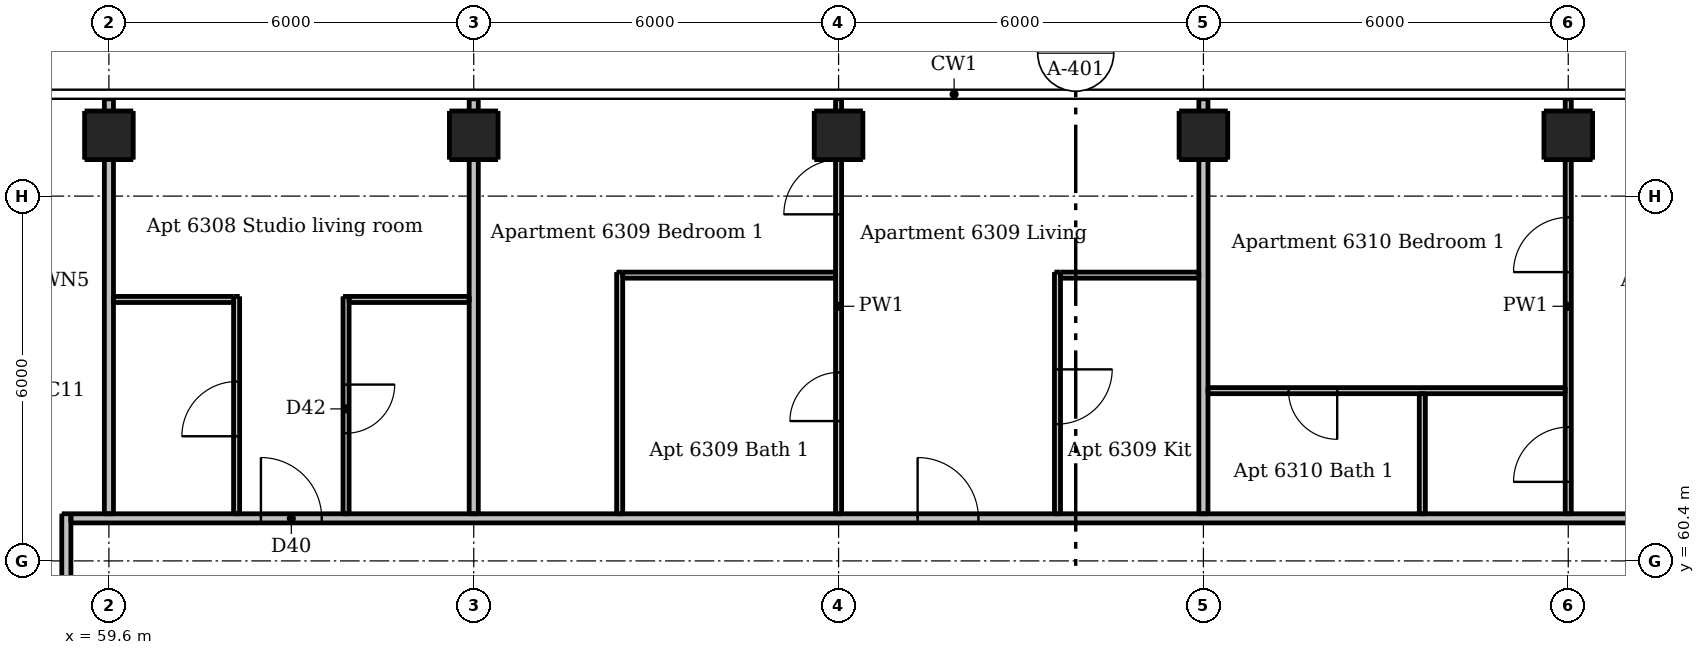
"""IFC4 building model, lengths in metres.
Left out: names, types, materials, properties, quantities, classifications, styles, units other than length and angle.
Written with IfcOpenShell. Run it as: python <this file> out.ifc"""

import sys

from ifc_helpers import new_model, si_unit, direction, frame, frame_2d, origin, origin_2d, place, context, subcontext, project, spatial, rectangle, extrude, element, fill, save


model = new_model("IFC4")
c1 = context("Model", 3, precision=1e-05, world=origin(), true_north=direction((0.0, 1.0)))
c2 = subcontext(c1, "Body", "Model", "MODEL_VIEW")
j1 = project(units=[si_unit("LENGTHUNIT", "METRE"), si_unit("PLANEANGLEUNIT", "RADIAN")], contexts=[c1])
p1 = place(None, origin())
s1 = spatial("IfcSite", under=j1, at=p1, CompositionType="ELEMENT")
p2 = place(p1, origin())
s2 = spatial("IfcBuilding", under=s1, at=p2, CompositionType="ELEMENT")
p3 = place(p2, frame((0.0, 0.0, 238.9)))
s3 = spatial("IfcBuildingStorey", under=s2, at=p3, CompositionType="ELEMENT", Elevation=238.9)
for number, where, z_axis, x_axis in (
    (1, (59.6, 67.4, 0.0), (0.0, 0.0, 1.0), (1.0, 0.0, 0.0)),
    (2, (65.6, 67.4, 0.0), (0.0, 0.0, 1.0), (1.0, 0.0, 0.0)),
    (3, (71.6, 67.4, 0.0), (0.0, 0.0, 1.0), (1.0, 0.0, 0.0)),
    (4, (77.6, 67.4, 0.0), (0.0, 0.0, 1.0), (1.0, 0.0, 0.0)),
    (5, (83.6, 67.4, 0.0), (0.0, 0.0, 1.0), (1.0, 0.0, 0.0)),
):
    element("IfcColumn", number, at=place(p3, frame(where, z_axis=z_axis, x_axis=x_axis)), inside=s3, PredefinedType="COLUMN", context=c2, shape_type="SweptSolid", body=[
        extrude(rectangle(XDim=0.8, YDim=0.8, at=origin_2d()), origin(), (0.0, 0.0, 1.0), 3.05),
    ])
p4 = place(p3, frame((61.7, 61.175, 0.0), z_axis=(0.0, 0.0, 1.0), x_axis=(0.0, 1.0, 0.0)))
e6 = element("IfcWall", 6, at=p4, inside=s3, PredefinedType="PARTITIONING", context=c2, shape_type="SweptSolid", body=[
    extrude(rectangle(XDim=3.575, YDim=0.1, at=frame_2d((1.788, 0.0))), origin(), (0.0, 0.0, 1.0), 3.05),
])
p5 = place(p4, frame((1.275, 0.0, 0.0)))
e7 = element("IfcOpeningElement", 7, at=p5, cuts=e6, PredefinedType="OPENING", context=c2, shape_type="SweptSolid", body=[
    extrude(rectangle(XDim=0.9, YDim=2.1, at=frame_2d((0.45, 1.05))), frame((0.0, 0.06, 0.0), z_axis=(0.0, -1.0, 0.0), x_axis=(1.0, 0.0, 0.0)), (0.0, 0.0, 1.0), 0.12),
])
p6 = place(p3, frame((63.5, 64.75, 0.0), z_axis=(0.0, 0.0, 1.0), x_axis=(0.0, -1.0, 0.0)))
e8 = element("IfcWall", 8, at=p6, inside=s3, PredefinedType="PARTITIONING", context=c2, shape_type="SweptSolid", body=[
    extrude(rectangle(XDim=3.575, YDim=0.1, at=frame_2d((1.788, 0.0))), origin(), (0.0, 0.0, 1.0), 3.05),
])
p7 = place(p6, frame((1.45, 0.0, 0.0)))
e9 = element("IfcOpeningElement", 9, at=p7, cuts=e8, PredefinedType="OPENING", context=c2, shape_type="SweptSolid", body=[
    extrude(rectangle(XDim=0.8, YDim=2.1, at=frame_2d((0.4, 1.05))), frame((0.0, 0.06, 0.0), z_axis=(0.0, -1.0, 0.0), x_axis=(1.0, 0.0, 0.0)), (0.0, 0.0, 1.0), 0.12),
])
p8 = place(p3, frame((68.0, 61.175, 0.0), z_axis=(0.0, 0.0, 1.0), x_axis=(0.0, 1.0, 0.0)))
e10 = element("IfcWall", 10, at=p8, inside=s3, PredefinedType="PARTITIONING", context=c2, shape_type="SweptSolid", body=[
    extrude(rectangle(XDim=3.975, YDim=0.1, at=frame_2d((1.987, 0.0))), origin(), (0.0, 0.0, 1.0), 3.05),
])
p9 = place(p3, frame((71.6, 61.175, 0.0), z_axis=(0.0, 0.0, 1.0), x_axis=(0.0, 1.0, 0.0)))
e11 = element("IfcWall", 11, at=p9, inside=s3, PredefinedType="PARTITIONING", context=c2, shape_type="SweptSolid", body=[
    extrude(rectangle(XDim=6.825, YDim=0.1, at=frame_2d((3.413, 0.0))), origin(), (0.0, 0.0, 1.0), 2.516),
])
p10 = place(p9, frame((4.925, 0.0, 0.0)))
e12 = element("IfcOpeningElement", 12, at=p10, cuts=e11, PredefinedType="OPENING", context=c2, shape_type="SweptSolid", body=[
    extrude(rectangle(XDim=0.9, YDim=2.1, at=frame_2d((0.45, 1.05))), frame((0.0, 0.06, 0.0), z_axis=(0.0, -1.0, 0.0), x_axis=(1.0, 0.0, 0.0)), (0.0, 0.0, 1.0), 0.12),
])
p11 = place(p9, frame((1.525, 0.0, 0.0)))
e13 = element("IfcOpeningElement", 13, at=p11, cuts=e11, PredefinedType="OPENING", context=c2, shape_type="SweptSolid", body=[
    extrude(rectangle(XDim=0.8, YDim=2.1, at=frame_2d((0.4, 1.05))), frame((0.0, 0.06, 0.0), z_axis=(0.0, -1.0, 0.0), x_axis=(1.0, 0.0, 0.0)), (0.0, 0.0, 1.0), 0.12),
])
p12 = place(p3, frame((75.2, 65.15, 0.0), z_axis=(0.0, 0.0, 1.0), x_axis=(0.0, -1.0, 0.0)))
e14 = element("IfcWall", 14, at=p12, inside=s3, PredefinedType="PARTITIONING", context=c2, shape_type="SweptSolid", body=[
    extrude(rectangle(XDim=3.975, YDim=0.1, at=frame_2d((1.987, 0.0))), origin(), (0.0, 0.0, 1.0), 3.05),
])
p13 = place(p12, frame((1.6, 0.0, 0.0)))
e15 = element("IfcOpeningElement", 15, at=p13, cuts=e14, PredefinedType="OPENING", context=c2, shape_type="SweptSolid", body=[
    extrude(rectangle(XDim=0.9, YDim=2.1, at=frame_2d((0.45, 1.05))), frame((0.0, 0.06, 0.0), z_axis=(0.0, -1.0, 0.0), x_axis=(1.0, 0.0, 0.0)), (0.0, 0.0, 1.0), 0.12),
])
p14 = place(p3, frame((81.2, 61.175, 0.0), z_axis=(0.0, 0.0, 1.0), x_axis=(0.0, 1.0, 0.0)))
e16 = element("IfcWall", 16, at=p14, inside=s3, PredefinedType="PARTITIONING", context=c2, shape_type="SweptSolid", body=[
    extrude(rectangle(XDim=1.975, YDim=0.1, at=frame_2d((0.987, 0.0))), origin(), (0.0, 0.0, 1.0), 3.05),
])
p15 = place(p3, frame((83.6, 61.175, 0.0), z_axis=(0.0, 0.0, 1.0), x_axis=(0.0, 1.0, 0.0)))
e17 = element("IfcWall", 17, at=p15, inside=s3, PredefinedType="PARTITIONING", context=c2, shape_type="SweptSolid", body=[
    extrude(rectangle(XDim=6.825, YDim=0.1, at=frame_2d((3.413, 0.0))), origin(), (0.0, 0.0, 1.0), 2.516),
])
p16 = place(p15, frame((0.525, 0.0, 0.0)))
e18 = element("IfcOpeningElement", 18, at=p16, cuts=e17, PredefinedType="OPENING", context=c2, shape_type="SweptSolid", body=[
    extrude(rectangle(XDim=0.9, YDim=2.1, at=frame_2d((0.45, 1.05))), frame((0.0, 0.06, 0.0), z_axis=(0.0, -1.0, 0.0), x_axis=(1.0, 0.0, 0.0)), (0.0, 0.0, 1.0), 0.12),
])
p17 = place(p15, frame((3.975, 0.0, 0.0)))
e19 = element("IfcOpeningElement", 19, at=p17, cuts=e17, PredefinedType="OPENING", context=c2, shape_type="SweptSolid", body=[
    extrude(rectangle(XDim=0.9, YDim=2.1, at=frame_2d((0.45, 1.05))), frame((0.0, 0.06, 0.0), z_axis=(0.0, -1.0, 0.0), x_axis=(1.0, 0.0, 0.0)), (0.0, 0.0, 1.0), 0.12),
])
p18 = place(p3, frame((68.05, 65.1, 0.0), z_axis=(0.0, 0.0, 1.0), x_axis=(1.0, 0.0, 0.0)))
e20 = element("IfcWall", 20, at=p18, inside=s3, PredefinedType="PARTITIONING", context=c2, shape_type="SweptSolid", body=[
    extrude(rectangle(XDim=3.5, YDim=0.1, at=frame_2d((1.75, 0.0))), origin(), (0.0, 0.0, 1.0), 3.05),
])
p19 = place(p3, frame((75.25, 65.1, 0.0), z_axis=(0.0, 0.0, 1.0), x_axis=(1.0, 0.0, 0.0)))
e21 = element("IfcWall", 21, at=p19, inside=s3, PredefinedType="PARTITIONING", context=c2, shape_type="SweptSolid", body=[
    extrude(rectangle(XDim=2.275, YDim=0.1, at=frame_2d((1.137, 0.0))), origin(), (0.0, 0.0, 1.0), 3.05),
])
for number, where, z_axis, x_axis in (
    (22, (59.675, 64.7, 0.0), (0.0, 0.0, 1.0), (1.0, 0.0, 0.0)),
    (23, (63.55, 64.7, 0.0), (0.0, 0.0, 1.0), (1.0, 0.0, 0.0)),
):
    element("IfcWall", number, at=place(p3, frame(where, z_axis=z_axis, x_axis=x_axis)), inside=s3, PredefinedType="PARTITIONING", context=c2, shape_type="SweptSolid", body=[
        extrude(rectangle(XDim=1.975, YDim=0.1, at=frame_2d((0.987, 0.0))), origin(), (0.0, 0.0, 1.0), 3.05),
    ])
p20 = place(p3, frame((83.55, 63.2, 0.0), z_axis=(0.0, 0.0, 1.0), x_axis=(-1.0, 0.0, 0.0)))
e24 = element("IfcWall", 24, at=p20, inside=s3, PredefinedType="PARTITIONING", context=c2, shape_type="SweptSolid", body=[
    extrude(rectangle(XDim=5.875, YDim=0.1, at=frame_2d((2.938, 0.0))), origin(), (0.0, 0.0, 1.0), 3.05),
])
p21 = place(p20, frame((3.75, 0.0, 0.0)))
e25 = element("IfcOpeningElement", 25, at=p21, cuts=e24, PredefinedType="OPENING", context=c2, shape_type="SweptSolid", body=[
    extrude(rectangle(XDim=0.8, YDim=2.1, at=frame_2d((0.4, 1.05))), frame((0.0, 0.06, 0.0), z_axis=(0.0, -1.0, 0.0), x_axis=(1.0, 0.0, 0.0)), (0.0, 0.0, 1.0), 0.12),
])
p22 = place(p3, frame((58.9, 30.325, 0.0), z_axis=(0.0, 0.0, 1.0), x_axis=(0.0, 1.0, 0.0)))
e26 = element("IfcWall", 26, at=p22, inside=s3, PredefinedType="PARTITIONING", context=c2, shape_type="SweptSolid", body=[
    extrude(rectangle(XDim=30.85, YDim=0.15, at=frame_2d((15.425, 0.0))), origin(), (0.0, 0.0, 1.0), 3.05),
])
p23 = place(p22, frame((2.575, 0.0, 0.0)))
e27 = element("IfcOpeningElement", 27, at=p23, cuts=e26, PredefinedType="OPENING", context=c2, shape_type="SweptSolid", body=[
    extrude(rectangle(XDim=1.0, YDim=2.1, at=frame_2d((0.5, 1.05))), frame((0.0, 0.085, 0.0), z_axis=(0.0, -1.0, 0.0), x_axis=(1.0, 0.0, 0.0)), (0.0, 0.0, 1.0), 0.17),
])
p24 = place(p22, frame((8.575, 0.0, 0.0)))
e28 = element("IfcOpeningElement", 28, at=p24, cuts=e26, PredefinedType="OPENING", context=c2, shape_type="SweptSolid", body=[
    extrude(rectangle(XDim=1.0, YDim=2.1, at=frame_2d((0.5, 1.05))), frame((0.0, 0.085, 0.0), z_axis=(0.0, -1.0, 0.0), x_axis=(1.0, 0.0, 0.0)), (0.0, 0.0, 1.0), 0.17),
])
p25 = place(p22, frame((14.575, 0.0, 0.0)))
e29 = element("IfcOpeningElement", 29, at=p25, cuts=e26, PredefinedType="OPENING", context=c2, shape_type="SweptSolid", body=[
    extrude(rectangle(XDim=1.0, YDim=2.1, at=frame_2d((0.5, 1.05))), frame((0.0, 0.085, 0.0), z_axis=(0.0, -1.0, 0.0), x_axis=(1.0, 0.0, 0.0)), (0.0, 0.0, 1.0), 0.17),
])
p26 = place(p22, frame((26.925, 0.0, 0.0)))
e30 = element("IfcOpeningElement", 30, at=p26, cuts=e26, PredefinedType="OPENING", context=c2, shape_type="SweptSolid", body=[
    extrude(rectangle(XDim=1.0, YDim=2.1, at=frame_2d((0.5, 1.05))), frame((0.0, 0.085, 0.0), z_axis=(0.0, -1.0, 0.0), x_axis=(1.0, 0.0, 0.0)), (0.0, 0.0, 1.0), 0.17),
])
p27 = place(p3, frame((59.6, 61.175, 0.0), z_axis=(0.0, 0.0, 1.0), x_axis=(0.0, 1.0, 0.0)))
e31 = element("IfcWall", 31, at=p27, inside=s3, PredefinedType="PARTITIONING", context=c2, shape_type="SweptSolid", body=[
    extrude(rectangle(XDim=6.825, YDim=0.15, at=frame_2d((3.413, 0.0))), origin(), (0.0, 0.0, 1.0), 2.51),
])
for number, where, z_axis, x_axis in (
    (32, (65.6, 61.175, 0.0), (0.0, 0.0, 1.0), (0.0, 1.0, 0.0)),
    (33, (77.6, 61.175, 0.0), (0.0, 0.0, 1.0), (0.0, 1.0, 0.0)),
):
    element("IfcWall", number, at=place(p3, frame(where, z_axis=z_axis, x_axis=x_axis)), inside=s3, PredefinedType="PARTITIONING", context=c2, shape_type="SweptSolid", body=[
        extrude(rectangle(XDim=6.825, YDim=0.15, at=frame_2d((3.413, 0.0))), origin(), (0.0, 0.0, 1.0), 2.516),
    ])
p28 = place(p3, frame((58.975, 61.1, 0.0), z_axis=(0.0, 0.0, 1.0), x_axis=(1.0, 0.0, 0.0)))
e34 = element("IfcWall", 34, at=p28, inside=s3, PredefinedType="PARTITIONING", context=c2, shape_type="SweptSolid", body=[
    extrude(rectangle(XDim=29.25, YDim=0.15, at=frame_2d((14.625, 0.0))), origin(), (0.0, 0.0, 1.0), 3.05),
])
p29 = place(p28, frame((3.125, 0.0, 0.0)))
e35 = element("IfcOpeningElement", 35, at=p29, cuts=e34, PredefinedType="OPENING", context=c2, shape_type="SweptSolid", body=[
    extrude(rectangle(XDim=1.0, YDim=2.1, at=frame_2d((0.5, 1.05))), frame((0.0, 0.085, 0.0), z_axis=(0.0, -1.0, 0.0), x_axis=(1.0, 0.0, 0.0)), (0.0, 0.0, 1.0), 0.17),
])
p30 = place(p28, frame((13.925, 0.0, 0.0)))
e36 = element("IfcOpeningElement", 36, at=p30, cuts=e34, PredefinedType="OPENING", context=c2, shape_type="SweptSolid", body=[
    extrude(rectangle(XDim=1.0, YDim=2.1, at=frame_2d((0.5, 1.05))), frame((0.0, 0.085, 0.0), z_axis=(0.0, -1.0, 0.0), x_axis=(1.0, 0.0, 0.0)), (0.0, 0.0, 1.0), 0.17),
])
p31 = place(p28, frame((26.475, 0.0, 0.0)))
e37 = element("IfcOpeningElement", 37, at=p31, cuts=e34, PredefinedType="OPENING", context=c2, shape_type="SweptSolid", body=[
    extrude(rectangle(XDim=1.0, YDim=2.1, at=frame_2d((0.5, 1.05))), frame((0.0, 0.085, 0.0), z_axis=(0.0, -1.0, 0.0), x_axis=(1.0, 0.0, 0.0)), (0.0, 0.0, 1.0), 0.17),
])
p32 = place(p29, origin())
e38 = element("IfcDoor", 38, at=p32, inside=s3, OperationType="SINGLE_SWING_LEFT", PredefinedType="DOOR", context=c2, shape_type="SweptSolid", body=[
    extrude(rectangle(XDim=1.0, YDim=2.1, at=frame_2d((0.5, 1.05))), frame((0.0, 0.025, 0.0), z_axis=(0.0, -1.0, 0.0), x_axis=(1.0, 0.0, 0.0)), (0.0, 0.0, 1.0), 0.05),
])
fill(e35, e38)
p33 = place(p5, origin())
e39 = element("IfcDoor", 39, at=p33, inside=s3, OperationType="SINGLE_SWING_LEFT", PredefinedType="DOOR", context=c2, shape_type="SweptSolid", body=[
    extrude(rectangle(XDim=0.9, YDim=2.1, at=frame_2d((0.45, 1.05))), frame((0.0, 0.025, 0.0), z_axis=(0.0, -1.0, 0.0), x_axis=(1.0, 0.0, 0.0)), (0.0, 0.0, 1.0), 0.05),
])
fill(e7, e39)
p34 = place(p7, origin())
e40 = element("IfcDoor", 40, at=p34, inside=s3, OperationType="SINGLE_SWING_LEFT", PredefinedType="DOOR", context=c2, shape_type="SweptSolid", body=[
    extrude(rectangle(XDim=0.8, YDim=2.1, at=frame_2d((0.4, 1.05))), frame((0.0, 0.025, 0.0), z_axis=(0.0, -1.0, 0.0), x_axis=(1.0, 0.0, 0.0)), (0.0, 0.0, 1.0), 0.05),
])
fill(e9, e40)
p35 = place(p30, origin())
e41 = element("IfcDoor", 41, at=p35, inside=s3, OperationType="SINGLE_SWING_LEFT", PredefinedType="DOOR", context=c2, shape_type="SweptSolid", body=[
    extrude(rectangle(XDim=1.0, YDim=2.1, at=frame_2d((0.5, 1.05))), frame((0.0, 0.025, 0.0), z_axis=(0.0, -1.0, 0.0), x_axis=(1.0, 0.0, 0.0)), (0.0, 0.0, 1.0), 0.05),
])
fill(e36, e41)
p36 = place(p13, origin())
e42 = element("IfcDoor", 42, at=p36, inside=s3, OperationType="SINGLE_SWING_LEFT", PredefinedType="DOOR", context=c2, shape_type="SweptSolid", body=[
    extrude(rectangle(XDim=0.9, YDim=2.1, at=frame_2d((0.45, 1.05))), frame((0.0, 0.025, 0.0), z_axis=(0.0, -1.0, 0.0), x_axis=(1.0, 0.0, 0.0)), (0.0, 0.0, 1.0), 0.05),
])
fill(e15, e42)
p37 = place(p10, origin())
e43 = element("IfcDoor", 43, at=p37, inside=s3, OperationType="SINGLE_SWING_LEFT", PredefinedType="DOOR", context=c2, shape_type="SweptSolid", body=[
    extrude(rectangle(XDim=0.9, YDim=2.1, at=frame_2d((0.45, 1.05))), frame((0.0, 0.025, 0.0), z_axis=(0.0, -1.0, 0.0), x_axis=(1.0, 0.0, 0.0)), (0.0, 0.0, 1.0), 0.05),
])
fill(e12, e43)
p38 = place(p11, origin())
e44 = element("IfcDoor", 44, at=p38, inside=s3, OperationType="SINGLE_SWING_LEFT", PredefinedType="DOOR", context=c2, shape_type="SweptSolid", body=[
    extrude(rectangle(XDim=0.8, YDim=2.1, at=frame_2d((0.4, 1.05))), frame((0.0, 0.025, 0.0), z_axis=(0.0, -1.0, 0.0), x_axis=(1.0, 0.0, 0.0)), (0.0, 0.0, 1.0), 0.05),
])
fill(e13, e44)
p39 = place(p16, origin())
e45 = element("IfcDoor", 45, at=p39, inside=s3, OperationType="SINGLE_SWING_LEFT", PredefinedType="DOOR", context=c2, shape_type="SweptSolid", body=[
    extrude(rectangle(XDim=0.9, YDim=2.1, at=frame_2d((0.45, 1.05))), frame((0.0, 0.025, 0.0), z_axis=(0.0, -1.0, 0.0), x_axis=(1.0, 0.0, 0.0)), (0.0, 0.0, 1.0), 0.05),
])
fill(e18, e45)
p40 = place(p17, origin())
e46 = element("IfcDoor", 46, at=p40, inside=s3, OperationType="SINGLE_SWING_LEFT", PredefinedType="DOOR", context=c2, shape_type="SweptSolid", body=[
    extrude(rectangle(XDim=0.9, YDim=2.1, at=frame_2d((0.45, 1.05))), frame((0.0, 0.025, 0.0), z_axis=(0.0, -1.0, 0.0), x_axis=(1.0, 0.0, 0.0)), (0.0, 0.0, 1.0), 0.05),
])
fill(e19, e46)
p41 = place(p21, origin())
e47 = element("IfcDoor", 47, at=p41, inside=s3, OperationType="SINGLE_SWING_LEFT", PredefinedType="DOOR", context=c2, shape_type="SweptSolid", body=[
    extrude(rectangle(XDim=0.8, YDim=2.1, at=frame_2d((0.4, 1.05))), frame((0.0, 0.025, 0.0), z_axis=(0.0, -1.0, 0.0), x_axis=(1.0, 0.0, 0.0)), (0.0, 0.0, 1.0), 0.05),
])
fill(e25, e47)
save(model, sys.argv[1])
